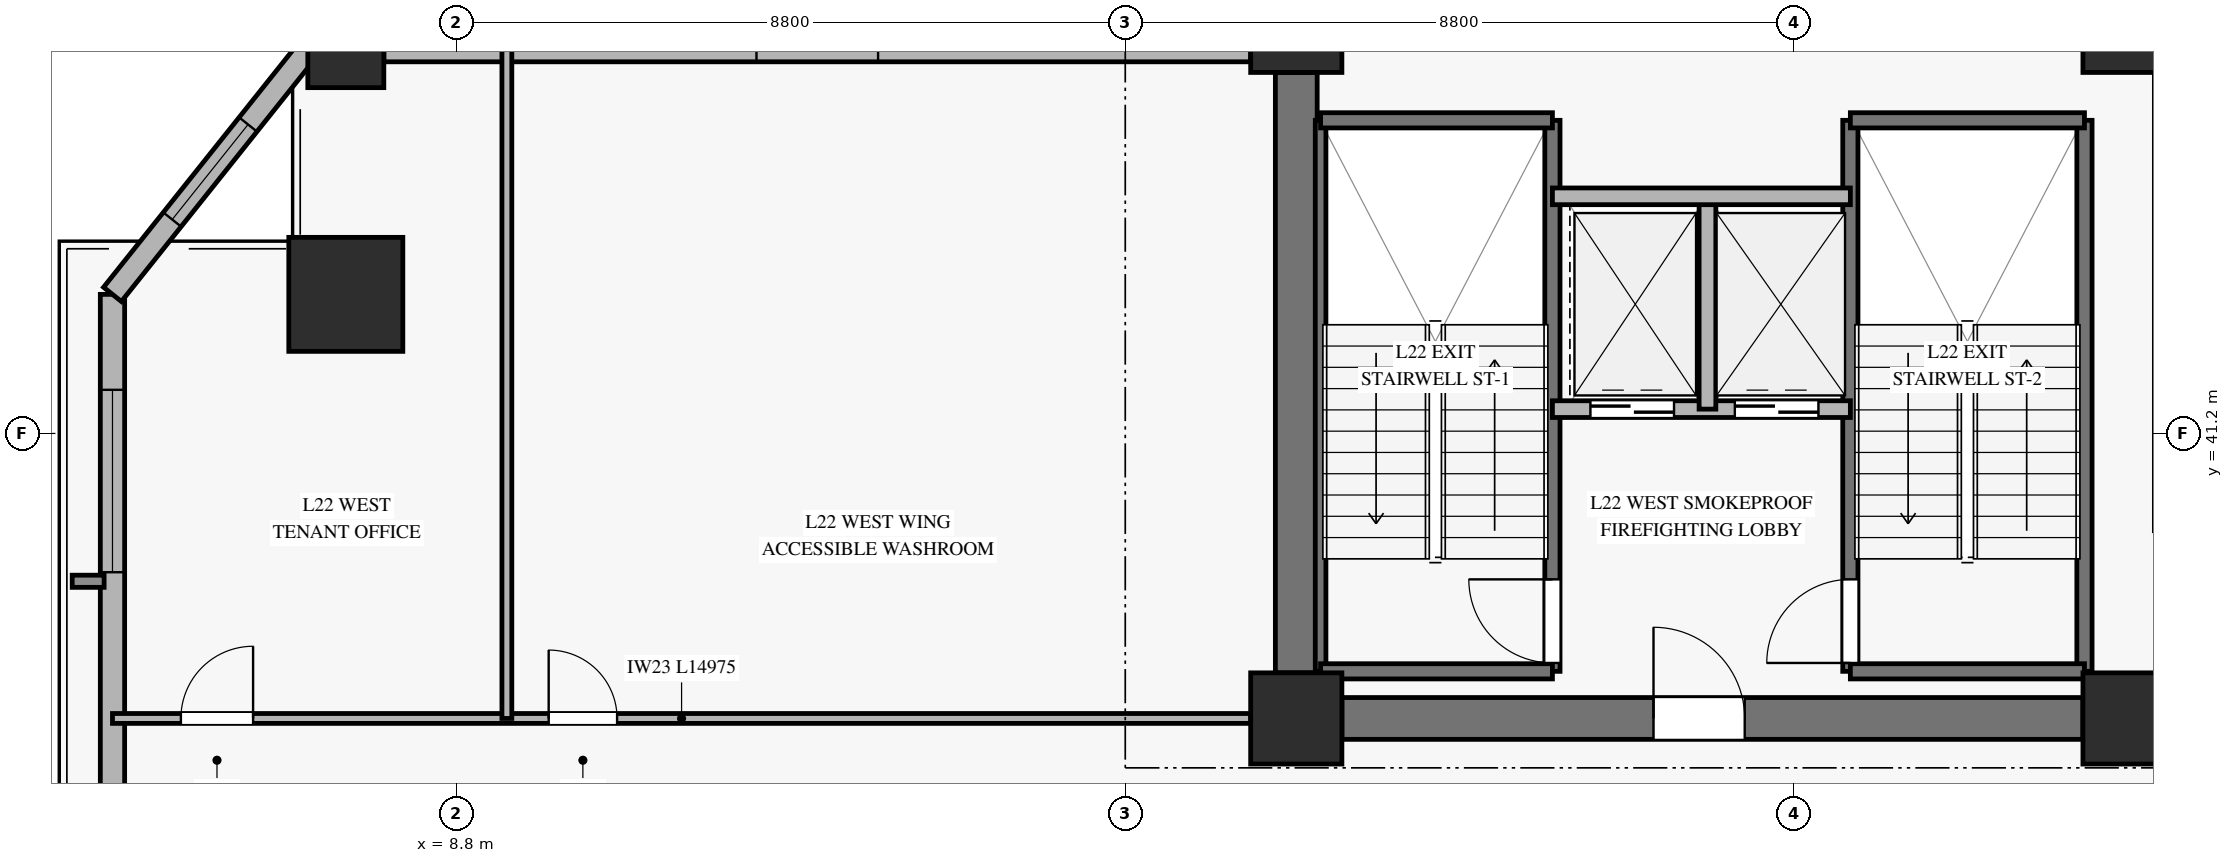
"""IFC4 building model, lengths in metres.
Left out: names, types, materials, properties, quantities, classifications, styles, units other than length and angle.
Written with IfcOpenShell. Run it as: python <this file> out.ifc"""

import sys

from ifc_helpers import new_model, si_unit, direction, frame, frame_2d, origin, origin_2d, place, context, subcontext, project, spatial, rectangle, hollow_rectangle, extrude, source, transform, mapped, element, fill, save


model = new_model("IFC4")
c1 = context("Model", 3, precision=1e-05, world=origin(), true_north=direction((0.0, 1.0)))
c2 = subcontext(c1, "Body", "Model", "MODEL_VIEW")
j1 = project(units=[si_unit("LENGTHUNIT", "METRE"), si_unit("PLANEANGLEUNIT", "RADIAN")], contexts=[c1])
p1 = place(None, origin())
s1 = spatial("IfcSite", under=j1, at=p1, CompositionType="ELEMENT")
p2 = place(p1, origin())
s2 = spatial("IfcBuilding", under=s1, at=p2, CompositionType="ELEMENT")
p3 = place(p2, frame((0.0, 0.0, 91.3)))
s3 = spatial("IfcBuildingStorey", under=s2, at=p3, CompositionType="ELEMENT", Elevation=91.3)
m1 = source(origin(), c2, "Body", "SweptSolid", [
    extrude(rectangle(XDim=1.2, YDim=1.2, at=origin_2d()), origin(), (0.0, 0.0, 1.0), 3.62),
])
for number, where, z_axis, x_axis in (
    (1, (19.85, 37.45, 0.0), (0.0, 0.0, 1.0), (1.0, 0.0, 0.0)),
    (2, (19.85, 46.55, 0.0), (0.0, 0.0, 1.0), (1.0, 0.0, 0.0)),
    (3, (30.8, 37.45, 0.0), (0.0, 0.0, 1.0), (1.0, 0.0, 0.0)),
    (4, (30.8, 46.55, 0.0), (0.0, 0.0, 1.0), (1.0, 0.0, 0.0)),
):
    element("IfcColumn", number, at=place(p3, frame(where, z_axis=z_axis, x_axis=x_axis)), inside=s3, PredefinedType="PILASTER", context=c2, shape_type="MappedRepresentation", body=[
        mapped(m1, transform((0.0, 0.0, 0.0), x_axis=(1.0, 0.0, 0.0), y_axis=(0.0, 1.0, 0.0), z_axis=(0.0, 0.0, 1.0), scale=1.0)),
    ])
p4 = place(p3, frame((20.45, 37.45, 0.0), z_axis=(0.0, 0.0, 1.0), x_axis=(1.0, 0.0, 0.0)))
e5 = element("IfcWall", 5, at=p4, inside=s3, PredefinedType="SHEAR", context=c2, shape_type="SweptSolid", body=[
    extrude(rectangle(XDim=9.75, YDim=0.55, at=frame_2d((4.875, 0.0))), origin(), (0.0, 0.0, 1.0), 3.62),
])
p5 = place(p4, frame((4.1, 0.0, 0.0)))
e6 = element("IfcOpeningElement", 6, at=p5, cuts=e5, PredefinedType="OPENING", context=c2, shape_type="SweptSolid", body=[
    extrude(rectangle(XDim=1.2, YDim=2.15, at=frame_2d((0.6, 1.075))), frame((0.0, 0.285, 0.0), z_axis=(0.0, -1.0, 0.0), x_axis=(1.0, 0.0, 0.0)), (0.0, 0.0, 1.0), 0.57),
])
p6 = place(p3, frame((19.85, 38.05, 0.0), z_axis=(0.0, 0.0, 1.0), x_axis=(0.0, 1.0, 0.0)))
e7 = element("IfcWall", 7, at=p6, inside=s3, PredefinedType="SHEAR", context=c2, shape_type="SweptSolid", body=[
    extrude(rectangle(XDim=7.9, YDim=0.55, at=frame_2d((3.95, 0.0))), origin(), (0.0, 0.0, 1.0), 3.62),
])
m2 = source(origin(), c2, "Body", "SweptSolid", [
    extrude(hollow_rectangle(XDim=1.5, YDim=1.5, WallThickness=0.07, at=origin_2d()), origin(), (0.0, 0.0, 1.0), 3.62),
])
p7 = place(p3, frame((7.345, 43.03, 0.0), z_axis=(0.0, 0.0, 1.0), x_axis=(1.0, 0.0, 0.0)))
e8 = element("IfcColumn", 8, at=p7, inside=s3, PredefinedType="COLUMN", context=c2, shape_type="MappedRepresentation", body=[
    mapped(m2, transform((0.0, 0.0, 0.0), x_axis=(1.0, 0.0, 0.0), y_axis=(0.0, 1.0, 0.0), z_axis=(0.0, 0.0, 1.0), scale=1.0)),
])
m3 = source(origin(), c2, "Body", "SweptSolid", [
    extrude(hollow_rectangle(XDim=1.0, YDim=1.0, WallThickness=0.045, at=origin_2d()), origin(), (0.0, 0.0, 1.0), 3.62),
])
p8 = place(p3, frame((7.345, 46.25, 0.0), z_axis=(0.0, 0.0, 1.0), x_axis=(1.0, 0.0, 0.0)))
e9 = element("IfcColumn", 9, at=p8, inside=s3, PredefinedType="COLUMN", context=c2, shape_type="MappedRepresentation", body=[
    mapped(m3, transform((0.0, 0.0, 0.0), x_axis=(1.0, 0.0, 0.0), y_axis=(0.0, 1.0, 0.0), z_axis=(0.0, 0.0, 1.0), scale=1.0)),
])
p9 = place(p3, frame((4.275, 26.518, 0.0), z_axis=(0.0, 0.0, 1.0), x_axis=(0.0, 1.0, 0.0)))
e10 = element("IfcWall", 10, at=p9, inside=s3, PredefinedType="SOLIDWALL", context=c2, shape_type="SweptSolid", body=[
    extrude(rectangle(XDim=16.512, YDim=0.32, at=frame_2d((8.256, 0.0))), origin(), (0.0, 0.0, 1.0), 3.1),
])
p10 = place(p9, frame((1.545, 0.0, 0.45)))
e11 = element("IfcOpeningElement", 11, at=p10, cuts=e10, PredefinedType="OPENING", context=c2, shape_type="SweptSolid", body=[
    extrude(rectangle(XDim=2.4, YDim=2.1, at=frame_2d((1.2, 1.05))), frame((0.0, 0.17, 0.0), z_axis=(0.0, -1.0, 0.0), x_axis=(1.0, 0.0, 0.0)), (0.0, 0.0, 1.0), 0.34),
])
p11 = place(p9, frame((12.856, 0.0, 0.45)))
e12 = element("IfcOpeningElement", 12, at=p11, cuts=e10, PredefinedType="OPENING", context=c2, shape_type="SweptSolid", body=[
    extrude(rectangle(XDim=2.4, YDim=2.1, at=frame_2d((1.2, 1.05))), frame((0.0, 0.17, 0.0), z_axis=(0.0, -1.0, 0.0), x_axis=(1.0, 0.0, 0.0)), (0.0, 0.0, 1.0), 0.34),
])
p12 = place(p3, frame((7.845, 46.25, 0.0), z_axis=(0.0, 0.0, 1.0), x_axis=(1.0, 0.0, 0.0)))
e13 = element("IfcWall", 13, at=p12, inside=s3, PredefinedType="SOLIDWALL", context=c2, shape_type="SweptSolid", body=[
    extrude(rectangle(XDim=11.405, YDim=0.32, at=frame_2d((5.703, 0.0))), origin(), (0.0, 0.0, 1.0), 3.1),
])
p13 = place(p12, frame((4.903, 0.0, 0.45)))
e14 = element("IfcOpeningElement", 14, at=p13, cuts=e13, PredefinedType="OPENING", context=c2, shape_type="SweptSolid", body=[
    extrude(rectangle(XDim=1.6, YDim=2.0, at=frame_2d((0.8, 1.0))), frame((0.0, 0.17, 0.0), z_axis=(0.0, -1.0, 0.0), x_axis=(1.0, 0.0, 0.0)), (0.0, 0.0, 1.0), 0.34),
])
p14 = place(p3, frame((6.845, 46.25, 0.0), z_axis=(0.0, 0.0, 1.0), x_axis=(-0.623820223262, -0.781567865926, 0.0)))
e15 = element("IfcWall", 15, at=p14, inside=s3, PredefinedType="SOLIDWALL", context=c2, shape_type="SweptSolid", body=[
    extrude(rectangle(XDim=4.12, YDim=0.3, at=frame_2d((2.06, 0.0))), origin(), (0.0, 0.0, 1.0), 3.1),
])
p15 = place(p14, frame((1.26, 0.0, 0.45)))
e16 = element("IfcOpeningElement", 16, at=p15, cuts=e15, PredefinedType="OPENING", context=c2, shape_type="SweptSolid", body=[
    extrude(rectangle(XDim=1.6, YDim=2.0, at=frame_2d((0.8, 1.0))), frame((0.0, 0.16, 0.0), z_axis=(0.0, -1.0, 0.0), x_axis=(1.0, 0.0, 0.0)), (0.0, 0.0, 1.0), 0.32),
])
p16 = place(p3, frame((20.17, 38.07, 0.0), z_axis=(0.0, 0.0, 1.0), x_axis=(0.0, 1.0, 0.0)))
e17 = element("IfcWall", 17, at=p16, inside=s3, PredefinedType="SOLIDWALL", context=c2, shape_type="SweptSolid", body=[
    extrude(rectangle(XDim=7.25, YDim=0.14, at=frame_2d((3.625, 0.0))), origin(), (0.0, 0.0, 1.0), 3.9),
])
p17 = place(p3, frame((23.22, 38.07, 0.0), z_axis=(0.0, 0.0, 1.0), x_axis=(0.0, 1.0, 0.0)))
e18 = element("IfcWall", 18, at=p17, inside=s3, PredefinedType="SOLIDWALL", context=c2, shape_type="SweptSolid", body=[
    extrude(rectangle(XDim=7.25, YDim=0.2, at=frame_2d((3.625, 0.0))), origin(), (0.0, 0.0, 1.0), 3.9),
])
p18 = place(p17, frame((0.11, 0.0, 0.0)))
e19 = element("IfcOpeningElement", 19, at=p18, cuts=e18, PredefinedType="OPENING", context=c2, shape_type="SweptSolid", body=[
    extrude(rectangle(XDim=1.1, YDim=2.15, at=frame_2d((0.55, 1.075))), frame((0.0, 0.11, 0.0), z_axis=(0.0, -1.0, 0.0), x_axis=(1.0, 0.0, 0.0)), (0.0, 0.0, 1.0), 0.22),
])
for number, where, z_axis, x_axis in (
    (20, (20.17, 45.32, 0.0), (0.0, 0.0, 1.0), (1.0, 0.0, 0.0)),
    (21, (20.17, 38.07, 0.0), (0.0, 0.0, 1.0), (1.0, 0.0, 0.0)),
):
    element("IfcWall", number, at=place(p3, frame(where, z_axis=z_axis, x_axis=x_axis)), inside=s3, PredefinedType="SOLIDWALL", context=c2, shape_type="SweptSolid", body=[
        extrude(rectangle(XDim=3.05, YDim=0.2, at=frame_2d((1.525, 0.0))), origin(), (0.0, 0.0, 1.0), 3.9),
    ])
p19 = place(p3, frame((27.14, 38.07, 0.0), z_axis=(0.0, 0.0, 1.0), x_axis=(0.0, 1.0, 0.0)))
e22 = element("IfcWall", 22, at=p19, inside=s3, PredefinedType="SOLIDWALL", context=c2, shape_type="SweptSolid", body=[
    extrude(rectangle(XDim=7.25, YDim=0.2, at=frame_2d((3.625, 0.0))), origin(), (0.0, 0.0, 1.0), 3.9),
])
p20 = place(p19, frame((0.11, 0.0, 0.0)))
e23 = element("IfcOpeningElement", 23, at=p20, cuts=e22, PredefinedType="OPENING", context=c2, shape_type="SweptSolid", body=[
    extrude(rectangle(XDim=1.1, YDim=2.15, at=frame_2d((0.55, 1.075))), frame((0.0, 0.11, 0.0), z_axis=(0.0, -1.0, 0.0), x_axis=(1.0, 0.0, 0.0)), (0.0, 0.0, 1.0), 0.22),
])
p21 = place(p3, frame((30.22, 38.07, 0.0), z_axis=(0.0, 0.0, 1.0), x_axis=(0.0, 1.0, 0.0)))
e24 = element("IfcWall", 24, at=p21, inside=s3, PredefinedType="SOLIDWALL", context=c2, shape_type="SweptSolid", body=[
    extrude(rectangle(XDim=7.25, YDim=0.2, at=frame_2d((3.625, 0.0))), origin(), (0.0, 0.0, 1.0), 3.9),
])
for number, where, z_axis, x_axis in (
    (25, (27.14, 45.32, 0.0), (0.0, 0.0, 1.0), (1.0, 0.0, 0.0)),
    (26, (27.14, 38.07, 0.0), (0.0, 0.0, 1.0), (1.0, 0.0, 0.0)),
):
    element("IfcWall", number, at=place(p3, frame(where, z_axis=z_axis, x_axis=x_axis)), inside=s3, PredefinedType="SOLIDWALL", context=c2, shape_type="SweptSolid", body=[
        extrude(rectangle(XDim=3.08, YDim=0.2, at=frame_2d((1.54, 0.0))), origin(), (0.0, 0.0, 1.0), 3.9),
    ])
p22 = place(p3, frame((23.22, 41.52, 0.0), z_axis=(0.0, 0.0, 1.0), x_axis=(1.0, 0.0, 0.0)))
e27 = element("IfcWall", 27, at=p22, inside=s3, PredefinedType="SOLIDWALL", context=c2, shape_type="SweptSolid", body=[
    extrude(rectangle(XDim=3.92, YDim=0.22, at=frame_2d((1.96, 0.0))), origin(), (0.0, 0.0, 1.0), 3.62),
])
p23 = place(p22, frame((0.5, 0.0, 0.0)))
e28 = element("IfcOpeningElement", 28, at=p23, cuts=e27, PredefinedType="OPENING", context=c2, shape_type="SweptSolid", body=[
    extrude(rectangle(XDim=1.1, YDim=2.2, at=frame_2d((0.55, 1.1))), frame((0.0, 0.12, 0.0), z_axis=(0.0, -1.0, 0.0), x_axis=(1.0, 0.0, 0.0)), (0.0, 0.0, 1.0), 0.24),
])
p24 = place(p22, frame((2.4, 0.0, 0.0)))
e29 = element("IfcOpeningElement", 29, at=p24, cuts=e27, PredefinedType="OPENING", context=c2, shape_type="SweptSolid", body=[
    extrude(rectangle(XDim=1.1, YDim=2.2, at=frame_2d((0.55, 1.1))), frame((0.0, 0.12, 0.0), z_axis=(0.0, -1.0, 0.0), x_axis=(1.0, 0.0, 0.0)), (0.0, 0.0, 1.0), 0.24),
])
p25 = place(p3, frame((25.26, 41.52, 0.0), z_axis=(0.0, 0.0, 1.0), x_axis=(0.0, 1.0, 0.0)))
e30 = element("IfcWall", 30, at=p25, inside=s3, PredefinedType="SOLIDWALL", context=c2, shape_type="SweptSolid", body=[
    extrude(rectangle(XDim=2.8, YDim=0.22, at=frame_2d((1.4, 0.0))), origin(), (0.0, 0.0, 1.0), 3.62),
])
p26 = place(p3, frame((23.22, 44.32, 0.0), z_axis=(0.0, 0.0, 1.0), x_axis=(1.0, 0.0, 0.0)))
e31 = element("IfcWall", 31, at=p26, inside=s3, PredefinedType="SOLIDWALL", context=c2, shape_type="SweptSolid", body=[
    extrude(rectangle(XDim=3.92, YDim=0.22, at=frame_2d((1.96, 0.0))), origin(), (0.0, 0.0, 1.0), 3.62),
])
p27 = place(p3, frame((4.275, 37.45, 0.0), z_axis=(0.0, 0.0, 1.0), x_axis=(1.0, 0.0, 0.0)))
e32 = element("IfcWall", 32, at=p27, inside=s3, PredefinedType="PARTITIONING", context=c2, shape_type="SweptSolid", body=[
    extrude(rectangle(XDim=14.975, YDim=0.13, at=frame_2d((7.488, 0.0))), origin(), (0.0, 0.0, 1.0), 3.105),
])
p28 = place(p27, frame((0.9, 0.0, 0.0)))
e33 = element("IfcOpeningElement", 33, at=p28, cuts=e32, PredefinedType="OPENING", context=c2, shape_type="SweptSolid", body=[
    extrude(rectangle(XDim=0.95, YDim=2.1, at=frame_2d((0.475, 1.05))), frame((0.0, 0.075, 0.0), z_axis=(0.0, -1.0, 0.0), x_axis=(1.0, 0.0, 0.0)), (0.0, 0.0, 1.0), 0.15),
])
p29 = place(p27, frame((5.739, 0.0, 0.0)))
e34 = element("IfcOpeningElement", 34, at=p29, cuts=e32, PredefinedType="OPENING", context=c2, shape_type="SweptSolid", body=[
    extrude(rectangle(XDim=0.9, YDim=2.1, at=frame_2d((0.45, 1.05))), frame((0.0, 0.075, 0.0), z_axis=(0.0, -1.0, 0.0), x_axis=(1.0, 0.0, 0.0)), (0.0, 0.0, 1.0), 0.15),
])
p30 = place(p3, frame((9.464, 37.45, 0.0), z_axis=(0.0, 0.0, 1.0), x_axis=(0.0, 1.0, 0.0)))
e35 = element("IfcWall", 35, at=p30, inside=s3, PredefinedType="PARTITIONING", context=c2, shape_type="SweptSolid", body=[
    extrude(rectangle(XDim=8.8, YDim=0.13, at=frame_2d((4.4, 0.0))), origin(), (0.0, 0.0, 1.0), 3.62),
])
m4 = source(origin(), c2, "Body", "SweptSolid", [
    extrude(rectangle(XDim=2.4, YDim=2.1, at=frame_2d((1.2, 1.05))), frame((0.0, 0.03, 0.0), z_axis=(0.0, -1.0, 0.0), x_axis=(1.0, 0.0, 0.0)), (0.0, 0.0, 1.0), 0.06),
])
p31 = place(p11, origin())
e36 = element("IfcWindow", 36, at=p31, inside=s3, PartitioningType="SINGLE_PANEL", PredefinedType="WINDOW", context=c2, shape_type="MappedRepresentation", body=[
    mapped(m4, transform((0.0, 0.0, 0.0), x_axis=(1.0, 0.0, 0.0), y_axis=(0.0, 1.0, 0.0), z_axis=(0.0, 0.0, 1.0), scale=1.0)),
])
fill(e12, e36)
m5 = source(origin(), c2, "Body", "SweptSolid", [
    extrude(rectangle(XDim=1.6, YDim=2.0, at=frame_2d((0.8, 1.0))), frame((0.0, 0.03, 0.0), z_axis=(0.0, -1.0, 0.0), x_axis=(1.0, 0.0, 0.0)), (0.0, 0.0, 1.0), 0.06),
])
p32 = place(p15, origin())
e37 = element("IfcWindow", 37, at=p32, inside=s3, PartitioningType="SINGLE_PANEL", PredefinedType="WINDOW", context=c2, shape_type="MappedRepresentation", body=[
    mapped(m5, transform((0.0, 0.0, 0.0), x_axis=(1.0, 0.0, 0.0), y_axis=(0.0, 1.0, 0.0), z_axis=(0.0, 0.0, 1.0), scale=1.0)),
])
fill(e16, e37)
m6 = source(origin(), c2, "Body", "SweptSolid", [
    extrude(rectangle(XDim=1.1, YDim=2.15, at=frame_2d((0.55, 1.075))), frame((0.0, 0.025, 0.0), z_axis=(0.0, -1.0, 0.0), x_axis=(1.0, 0.0, 0.0)), (0.0, 0.0, 1.0), 0.05),
])
p33 = place(p18, origin())
e38 = element("IfcDoor", 38, at=p33, inside=s3, OperationType="SINGLE_SWING_RIGHT", PredefinedType="DOOR", context=c2, shape_type="MappedRepresentation", body=[
    mapped(m6, transform((0.0, 0.0, 0.0), x_axis=(1.0, 0.0, 0.0), y_axis=(0.0, 1.0, 0.0), z_axis=(0.0, 0.0, 1.0), scale=1.0)),
])
fill(e19, e38)
p34 = place(p20, origin())
e39 = element("IfcDoor", 39, at=p34, inside=s3, OperationType="SINGLE_SWING_LEFT", PredefinedType="DOOR", context=c2, shape_type="MappedRepresentation", body=[
    mapped(m6, transform((0.0, 0.0, 0.0), x_axis=(1.0, 0.0, 0.0), y_axis=(0.0, 1.0, 0.0), z_axis=(0.0, 0.0, 1.0), scale=1.0)),
])
fill(e23, e39)
m7 = source(origin(), c2, "Body", "SweptSolid", [
    extrude(rectangle(XDim=1.1, YDim=2.2, at=frame_2d((0.55, 1.1))), frame((0.0, 0.025, 0.0), z_axis=(0.0, -1.0, 0.0), x_axis=(1.0, 0.0, 0.0)), (0.0, 0.0, 1.0), 0.05),
])
p35 = place(p23, origin())
e40 = element("IfcDoor", 40, at=p35, inside=s3, OperationType="SLIDING_TO_LEFT", PredefinedType="DOOR", context=c2, shape_type="MappedRepresentation", body=[
    mapped(m7, transform((0.0, 0.0, 0.0), x_axis=(1.0, 0.0, 0.0), y_axis=(0.0, 1.0, 0.0), z_axis=(0.0, 0.0, 1.0), scale=1.0)),
])
fill(e28, e40)
p36 = place(p24, origin())
e41 = element("IfcDoor", 41, at=p36, inside=s3, OperationType="SLIDING_TO_LEFT", PredefinedType="DOOR", context=c2, shape_type="MappedRepresentation", body=[
    mapped(m7, transform((0.0, 0.0, 0.0), x_axis=(1.0, 0.0, 0.0), y_axis=(0.0, 1.0, 0.0), z_axis=(0.0, 0.0, 1.0), scale=1.0)),
])
fill(e29, e41)
m8 = source(origin(), c2, "Body", "SweptSolid", [
    extrude(rectangle(XDim=1.2, YDim=2.15, at=frame_2d((0.6, 1.075))), frame((0.0, 0.025, 0.0), z_axis=(0.0, -1.0, 0.0), x_axis=(1.0, 0.0, 0.0)), (0.0, 0.0, 1.0), 0.05),
])
p37 = place(p5, origin())
e42 = element("IfcDoor", 42, at=p37, inside=s3, OperationType="SINGLE_SWING_LEFT", PredefinedType="DOOR", context=c2, shape_type="MappedRepresentation", body=[
    mapped(m8, transform((0.0, 0.0, 0.0), x_axis=(1.0, 0.0, 0.0), y_axis=(0.0, 1.0, 0.0), z_axis=(0.0, 0.0, 1.0), scale=1.0)),
])
fill(e6, e42)
m9 = source(origin(), c2, "Body", "SweptSolid", [
    extrude(rectangle(XDim=0.95, YDim=2.1, at=frame_2d((0.475, 1.05))), frame((0.0, 0.025, 0.0), z_axis=(0.0, -1.0, 0.0), x_axis=(1.0, 0.0, 0.0)), (0.0, 0.0, 1.0), 0.05),
])
p38 = place(p28, origin())
e43 = element("IfcDoor", 43, at=p38, inside=s3, OperationType="SINGLE_SWING_RIGHT", PredefinedType="DOOR", context=c2, shape_type="MappedRepresentation", body=[
    mapped(m9, transform((0.0, 0.0, 0.0), x_axis=(1.0, 0.0, 0.0), y_axis=(0.0, 1.0, 0.0), z_axis=(0.0, 0.0, 1.0), scale=1.0)),
])
fill(e33, e43)
m10 = source(origin(), c2, "Body", "SweptSolid", [
    extrude(rectangle(XDim=0.9, YDim=2.1, at=frame_2d((0.45, 1.05))), frame((0.0, 0.025, 0.0), z_axis=(0.0, -1.0, 0.0), x_axis=(1.0, 0.0, 0.0)), (0.0, 0.0, 1.0), 0.05),
])
p39 = place(p29, origin())
e44 = element("IfcDoor", 44, at=p39, inside=s3, OperationType="SINGLE_SWING_LEFT", PredefinedType="DOOR", context=c2, shape_type="MappedRepresentation", body=[
    mapped(m10, transform((0.0, 0.0, 0.0), x_axis=(1.0, 0.0, 0.0), y_axis=(0.0, 1.0, 0.0), z_axis=(0.0, 0.0, 1.0), scale=1.0)),
])
fill(e34, e44)
save(model, sys.argv[1])
